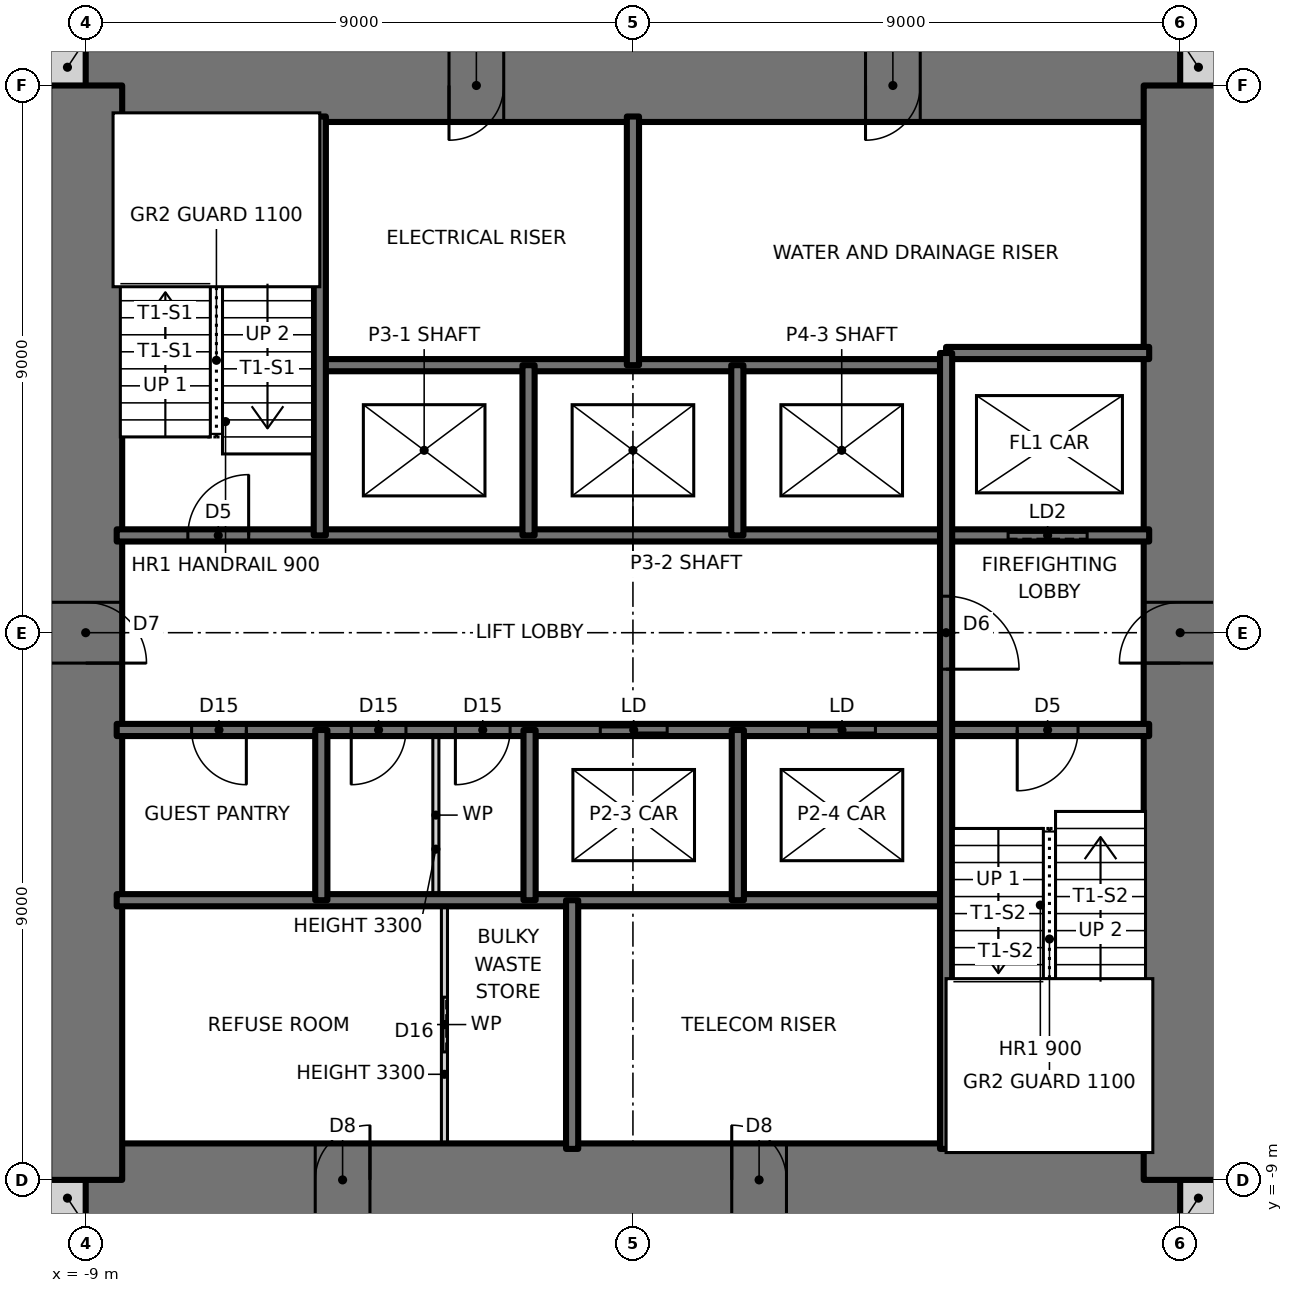
"""IFC4 building model, lengths in metres.
Left out: names, types, materials, properties, quantities, classifications, styles, units other than length and angle.
Written with IfcOpenShell. Run it as: python <this file> out.ifc"""

import sys

from ifc_helpers import new_model, si_unit, direction, frame, frame_2d, origin, place, context, subcontext, project, spatial, rectangle, extrude, element, fill, save


model = new_model("IFC4")
c1 = context("Model", 3, precision=1e-05, world=origin(), true_north=direction((0.0, 1.0)))
c2 = subcontext(c1, "Body", "Model", "MODEL_VIEW")
j1 = project(units=[si_unit("LENGTHUNIT", "METRE"), si_unit("PLANEANGLEUNIT", "RADIAN")], contexts=[c1])
p1 = place(None, origin())
s1 = spatial("IfcSite", under=j1, at=p1, CompositionType="ELEMENT")
p2 = place(p1, origin())
s2 = spatial("IfcBuilding", under=s1, at=p2, CompositionType="ELEMENT")
p3 = place(p2, frame((0.0, 0.0, 115.5)))
s3 = spatial("IfcBuildingStorey", under=s2, at=p3, CompositionType="ELEMENT", Elevation=115.5)
for number, where, z_axis, x_axis in (
    (1, (-9.6, -9.3, 0.0), (0.0, 0.0, 1.0), (1.0, 0.0, 0.0)),
    (2, (9.0, -9.3, 0.0), (0.0, 0.0, 1.0), (1.0, 0.0, 0.0)),
    (3, (9.0, 9.3, 0.0), (0.0, 0.0, 1.0), (1.0, 0.0, 0.0)),
    (4, (-9.6, 9.3, 0.0), (0.0, 0.0, 1.0), (1.0, 0.0, 0.0)),
):
    element("IfcWall", number, at=place(p3, frame(where, z_axis=z_axis, x_axis=x_axis)), inside=s3, PredefinedType="SOLIDWALL", context=c2, shape_type="SweptSolid", body=[
        extrude(rectangle(XDim=0.6, YDim=0.6, at=frame_2d((0.3, 0.0))), origin(), (0.0, 0.0, 1.0), 3.5),
    ])
p4 = place(p3, frame((-9.0, -9.0, 0.0), z_axis=(0.0, 0.0, 1.0), x_axis=(1.0, 0.0, 0.0)))
e5 = element("IfcWall", 5, at=p4, inside=s3, PredefinedType="SHEAR", context=c2, shape_type="SweptSolid", body=[
    extrude(rectangle(XDim=18.0, YDim=1.2, at=frame_2d((9.0, 0.0))), origin(), (0.0, 0.0, 1.0), 3.5),
])
p5 = place(p4, frame((3.775, 0.0, 0.0)))
e6 = element("IfcOpeningElement", 6, at=p5, cuts=e5, PredefinedType="OPENING", context=c2, shape_type="SweptSolid", body=[
    extrude(rectangle(XDim=0.9, YDim=2.1, at=frame_2d((0.45, 1.05))), frame((0.0, 0.61, 0.0), z_axis=(0.0, -1.0, 0.0), x_axis=(1.0, 0.0, 0.0)), (0.0, 0.0, 1.0), 1.22),
])
p6 = place(p4, frame((10.625, 0.0, 0.0)))
e7 = element("IfcOpeningElement", 7, at=p6, cuts=e5, PredefinedType="OPENING", context=c2, shape_type="SweptSolid", body=[
    extrude(rectangle(XDim=0.9, YDim=2.1, at=frame_2d((0.45, 1.05))), frame((0.0, 0.61, 0.0), z_axis=(0.0, -1.0, 0.0), x_axis=(1.0, 0.0, 0.0)), (0.0, 0.0, 1.0), 1.22),
])
p7 = place(p3, frame((9.0, 9.0, 0.0), z_axis=(0.0, 0.0, 1.0), x_axis=(-1.0, 0.0, 0.0)))
e8 = element("IfcWall", 8, at=p7, inside=s3, PredefinedType="SHEAR", context=c2, shape_type="SweptSolid", body=[
    extrude(rectangle(XDim=18.0, YDim=1.2, at=frame_2d((9.0, 0.0))), origin(), (0.0, 0.0, 1.0), 3.5),
])
p8 = place(p7, frame((11.125, 0.0, 0.0)))
e9 = element("IfcOpeningElement", 9, at=p8, cuts=e8, PredefinedType="OPENING", context=c2, shape_type="SweptSolid", body=[
    extrude(rectangle(XDim=0.9, YDim=2.1, at=frame_2d((0.45, 1.05))), frame((0.0, 0.61, 0.0), z_axis=(0.0, -1.0, 0.0), x_axis=(1.0, 0.0, 0.0)), (0.0, 0.0, 1.0), 1.22),
])
p9 = place(p7, frame((4.275, 0.0, 0.0)))
e10 = element("IfcOpeningElement", 10, at=p9, cuts=e8, PredefinedType="OPENING", context=c2, shape_type="SweptSolid", body=[
    extrude(rectangle(XDim=0.9, YDim=2.1, at=frame_2d((0.45, 1.05))), frame((0.0, 0.61, 0.0), z_axis=(0.0, -1.0, 0.0), x_axis=(1.0, 0.0, 0.0)), (0.0, 0.0, 1.0), 1.22),
])
p10 = place(p3, frame((9.0, -9.0, 0.0), z_axis=(0.0, 0.0, 1.0), x_axis=(0.0, 1.0, 0.0)))
e11 = element("IfcWall", 11, at=p10, inside=s3, PredefinedType="SHEAR", context=c2, shape_type="SweptSolid", body=[
    extrude(rectangle(XDim=18.0, YDim=1.2, at=frame_2d((9.0, 0.0))), origin(), (0.0, 0.0, 1.0), 3.5),
])
p11 = place(p10, frame((8.5, 0.0, 0.0)))
e12 = element("IfcOpeningElement", 12, at=p11, cuts=e11, PredefinedType="OPENING", context=c2, shape_type="SweptSolid", body=[
    extrude(rectangle(XDim=1.0, YDim=2.1, at=frame_2d((0.5, 1.05))), frame((0.0, 0.61, 0.0), z_axis=(0.0, -1.0, 0.0), x_axis=(1.0, 0.0, 0.0)), (0.0, 0.0, 1.0), 1.22),
])
p12 = place(p3, frame((-9.0, 9.0, 0.0), z_axis=(0.0, 0.0, 1.0), x_axis=(0.0, -1.0, 0.0)))
e13 = element("IfcWall", 13, at=p12, inside=s3, PredefinedType="SHEAR", context=c2, shape_type="SweptSolid", body=[
    extrude(rectangle(XDim=18.0, YDim=1.2, at=frame_2d((9.0, 0.0))), origin(), (0.0, 0.0, 1.0), 3.5),
])
p13 = place(p12, frame((8.5, 0.0, 0.0)))
e14 = element("IfcOpeningElement", 14, at=p13, cuts=e13, PredefinedType="OPENING", context=c2, shape_type="SweptSolid", body=[
    extrude(rectangle(XDim=1.0, YDim=2.1, at=frame_2d((0.5, 1.05))), frame((0.0, 0.61, 0.0), z_axis=(0.0, -1.0, 0.0), x_axis=(1.0, 0.0, 0.0)), (0.0, 0.0, 1.0), 1.22),
])
p14 = place(p3, frame((-8.49, -4.4, 0.0), z_axis=(0.0, 0.0, 1.0), x_axis=(1.0, 0.0, 0.0)))
e15 = element("IfcWall", 15, at=p14, inside=s3, PredefinedType="SOLIDWALL", context=c2, shape_type="SweptSolid", body=[
    extrude(rectangle(XDim=13.64, YDim=0.2, at=frame_2d((6.82, 0.0))), origin(), (0.0, 0.0, 1.0), 3.5),
])
p15 = place(p3, frame((-8.49, -1.6, 0.0), z_axis=(0.0, 0.0, 1.0), x_axis=(1.0, 0.0, 0.0)))
e16 = element("IfcWall", 16, at=p15, inside=s3, PredefinedType="SOLIDWALL", context=c2, shape_type="SweptSolid", body=[
    extrude(rectangle(XDim=16.98, YDim=0.2, at=frame_2d((8.49, 0.0))), origin(), (0.0, 0.0, 1.0), 3.5),
])
p16 = place(p15, frame((14.81, 0.0, 0.0)))
e17 = element("IfcOpeningElement", 17, at=p16, cuts=e16, PredefinedType="OPENING", context=c2, shape_type="SweptSolid", body=[
    extrude(rectangle(XDim=1.0, YDim=2.1, at=frame_2d((0.5, 1.05))), frame((0.0, 0.11, 0.0), z_axis=(0.0, -1.0, 0.0), x_axis=(1.0, 0.0, 0.0)), (0.0, 0.0, 1.0), 0.22),
])
p17 = place(p15, frame((1.232, 0.0, 0.0)))
e18 = element("IfcOpeningElement", 18, at=p17, cuts=e16, PredefinedType="OPENING", context=c2, shape_type="SweptSolid", body=[
    extrude(rectangle(XDim=0.9, YDim=2.1, at=frame_2d((0.45, 1.05))), frame((0.0, 0.11, 0.0), z_axis=(0.0, -1.0, 0.0), x_axis=(1.0, 0.0, 0.0)), (0.0, 0.0, 1.0), 0.22),
])
p18 = place(p15, frame((5.57, 0.0, 0.0)))
e19 = element("IfcOpeningElement", 19, at=p18, cuts=e16, PredefinedType="OPENING", context=c2, shape_type="SweptSolid", body=[
    extrude(rectangle(XDim=0.9, YDim=2.1, at=frame_2d((0.45, 1.05))), frame((0.0, 0.11, 0.0), z_axis=(0.0, -1.0, 0.0), x_axis=(1.0, 0.0, 0.0)), (0.0, 0.0, 1.0), 0.22),
])
p19 = place(p15, frame((3.857, 0.0, 0.0)))
e20 = element("IfcOpeningElement", 20, at=p19, cuts=e16, PredefinedType="OPENING", context=c2, shape_type="SweptSolid", body=[
    extrude(rectangle(XDim=0.9, YDim=2.1, at=frame_2d((0.45, 1.05))), frame((0.0, 0.11, 0.0), z_axis=(0.0, -1.0, 0.0), x_axis=(1.0, 0.0, 0.0)), (0.0, 0.0, 1.0), 0.22),
])
p20 = place(p15, frame((7.953, 0.0, 0.0)))
e21 = element("IfcOpeningElement", 21, at=p20, cuts=e16, PredefinedType="OPENING", context=c2, shape_type="SweptSolid", body=[
    extrude(rectangle(XDim=1.1, YDim=2.1, at=frame_2d((0.55, 1.05))), frame((0.0, 0.11, 0.0), z_axis=(0.0, -1.0, 0.0), x_axis=(1.0, 0.0, 0.0)), (0.0, 0.0, 1.0), 0.22),
])
p21 = place(p15, frame((11.378, 0.0, 0.0)))
e22 = element("IfcOpeningElement", 22, at=p21, cuts=e16, PredefinedType="OPENING", context=c2, shape_type="SweptSolid", body=[
    extrude(rectangle(XDim=1.1, YDim=2.1, at=frame_2d((0.55, 1.05))), frame((0.0, 0.11, 0.0), z_axis=(0.0, -1.0, 0.0), x_axis=(1.0, 0.0, 0.0)), (0.0, 0.0, 1.0), 0.22),
])
p22 = place(p3, frame((-8.49, 1.6, 0.0), z_axis=(0.0, 0.0, 1.0), x_axis=(1.0, 0.0, 0.0)))
e23 = element("IfcWall", 23, at=p22, inside=s3, PredefinedType="SOLIDWALL", context=c2, shape_type="SweptSolid", body=[
    extrude(rectangle(XDim=16.98, YDim=0.2, at=frame_2d((8.49, 0.0))), origin(), (0.0, 0.0, 1.0), 3.5),
])
p23 = place(p22, frame((1.17, 0.0, 0.0)))
e24 = element("IfcOpeningElement", 24, at=p23, cuts=e23, PredefinedType="OPENING", context=c2, shape_type="SweptSolid", body=[
    extrude(rectangle(XDim=1.0, YDim=2.1, at=frame_2d((0.5, 1.05))), frame((0.0, 0.11, 0.0), z_axis=(0.0, -1.0, 0.0), x_axis=(1.0, 0.0, 0.0)), (0.0, 0.0, 1.0), 0.22),
])
p24 = place(p22, frame((14.66, 0.0, 0.0)))
e25 = element("IfcOpeningElement", 25, at=p24, cuts=e23, PredefinedType="OPENING", context=c2, shape_type="SweptSolid", body=[
    extrude(rectangle(XDim=1.3, YDim=2.1, at=frame_2d((0.65, 1.05))), frame((0.0, 0.11, 0.0), z_axis=(0.0, -1.0, 0.0), x_axis=(1.0, 0.0, 0.0)), (0.0, 0.0, 1.0), 0.22),
])
p25 = place(p3, frame((-5.15, 4.4, 0.0), z_axis=(0.0, 0.0, 1.0), x_axis=(1.0, 0.0, 0.0)))
e26 = element("IfcWall", 26, at=p25, inside=s3, PredefinedType="SOLIDWALL", context=c2, shape_type="SweptSolid", body=[
    extrude(rectangle(XDim=10.3, YDim=0.2, at=frame_2d((5.15, 0.0))), origin(), (0.0, 0.0, 1.0), 3.5),
])
p26 = place(p3, frame((5.15, 4.6, 0.0), z_axis=(0.0, 0.0, 1.0), x_axis=(1.0, 0.0, 0.0)))
e27 = element("IfcWall", 27, at=p26, inside=s3, PredefinedType="SOLIDWALL", context=c2, shape_type="SweptSolid", body=[
    extrude(rectangle(XDim=3.34, YDim=0.2, at=frame_2d((1.67, 0.0))), origin(), (0.0, 0.0, 1.0), 3.5),
])
p27 = place(p3, frame((5.15, -8.49, 0.0), z_axis=(0.0, 0.0, 1.0), x_axis=(0.0, 1.0, 0.0)))
e28 = element("IfcWall", 28, at=p27, inside=s3, PredefinedType="SOLIDWALL", context=c2, shape_type="SweptSolid", body=[
    extrude(rectangle(XDim=13.09, YDim=0.2, at=frame_2d((6.545, 0.0))), origin(), (0.0, 0.0, 1.0), 3.5),
])
p28 = place(p27, frame((7.89, 0.0, 0.0)))
e29 = element("IfcOpeningElement", 29, at=p28, cuts=e28, PredefinedType="OPENING", context=c2, shape_type="SweptSolid", body=[
    extrude(rectangle(XDim=1.2, YDim=2.1, at=frame_2d((0.6, 1.05))), frame((0.0, 0.11, 0.0), z_axis=(0.0, -1.0, 0.0), x_axis=(1.0, 0.0, 0.0)), (0.0, 0.0, 1.0), 0.22),
])
for number, where, z_axis, x_axis in (
    (30, (1.725, -4.4, 0.0), (0.0, 0.0, 1.0), (0.0, 1.0, 0.0)),
    (31, (1.717, 1.6, 0.0), (0.0, 0.0, 1.0), (0.0, 1.0, 0.0)),
):
    element("IfcWall", number, at=place(p3, frame(where, z_axis=z_axis, x_axis=x_axis)), inside=s3, PredefinedType="SOLIDWALL", context=c2, shape_type="SweptSolid", body=[
        extrude(rectangle(XDim=2.8, YDim=0.2, at=frame_2d((1.4, 0.0))), origin(), (0.0, 0.0, 1.0), 3.5),
    ])
for number, where, z_axis, x_axis in (
    (32, (0.0, 4.4, 0.0), (0.0, 0.0, 1.0), (0.0, 1.0, 0.0)),
    (33, (-1.0, -8.49, 0.0), (0.0, 0.0, 1.0), (0.0, 1.0, 0.0)),
):
    element("IfcWall", number, at=place(p3, frame(where, z_axis=z_axis, x_axis=x_axis)), inside=s3, PredefinedType="SOLIDWALL", context=c2, shape_type="SweptSolid", body=[
        extrude(rectangle(XDim=4.09, YDim=0.2, at=frame_2d((2.045, 0.0))), origin(), (0.0, 0.0, 1.0), 3.5),
    ])
for number, where, z_axis, x_axis in (
    (34, (-1.7, -4.4, 0.0), (0.0, 0.0, 1.0), (0.0, 1.0, 0.0)),
    (35, (-1.717, 1.6, 0.0), (0.0, 0.0, 1.0), (0.0, 1.0, 0.0)),
):
    element("IfcWall", number, at=place(p3, frame(where, z_axis=z_axis, x_axis=x_axis)), inside=s3, PredefinedType="SOLIDWALL", context=c2, shape_type="SweptSolid", body=[
        extrude(rectangle(XDim=2.8, YDim=0.2, at=frame_2d((1.4, 0.0))), origin(), (0.0, 0.0, 1.0), 3.5),
    ])
p29 = place(p3, frame((-3.1, -8.49, 0.0), z_axis=(0.0, 0.0, 1.0), x_axis=(0.0, 1.0, 0.0)))
e36 = element("IfcWall", 36, at=p29, inside=s3, PredefinedType="PARTITIONING", context=c2, shape_type="SweptSolid", body=[
    extrude(rectangle(XDim=4.09, YDim=0.1, at=frame_2d((2.045, 0.0))), origin(), (0.0, 0.0, 1.0), 3.3),
])
p30 = place(p29, frame((1.595, 0.0, 0.0)))
e37 = element("IfcOpeningElement", 37, at=p30, cuts=e36, PredefinedType="OPENING", context=c2, shape_type="SweptSolid", body=[
    extrude(rectangle(XDim=0.9, YDim=2.1, at=frame_2d((0.45, 1.05))), frame((0.0, 0.06, 0.0), z_axis=(0.0, -1.0, 0.0), x_axis=(1.0, 0.0, 0.0)), (0.0, 0.0, 1.0), 0.12),
])
p31 = place(p3, frame((-3.241, -4.4, 0.0), z_axis=(0.0, 0.0, 1.0), x_axis=(0.0, 1.0, 0.0)))
e38 = element("IfcWall", 38, at=p31, inside=s3, PredefinedType="PARTITIONING", context=c2, shape_type="SweptSolid", body=[
    extrude(rectangle(XDim=2.8, YDim=0.1, at=frame_2d((1.4, 0.0))), origin(), (0.0, 0.0, 1.0), 3.3),
])
p32 = place(p3, frame((-5.125, -4.4, 0.0), z_axis=(0.0, 0.0, 1.0), x_axis=(0.0, 1.0, 0.0)))
e39 = element("IfcWall", 39, at=p32, inside=s3, PredefinedType="SOLIDWALL", context=c2, shape_type="SweptSolid", body=[
    extrude(rectangle(XDim=2.8, YDim=0.2, at=frame_2d((1.4, 0.0))), origin(), (0.0, 0.0, 1.0), 3.5),
])
p33 = place(p3, frame((-5.15, 1.6, 0.0), z_axis=(0.0, 0.0, 1.0), x_axis=(0.0, 1.0, 0.0)))
e40 = element("IfcWall", 40, at=p33, inside=s3, PredefinedType="SOLIDWALL", context=c2, shape_type="SweptSolid", body=[
    extrude(rectangle(XDim=6.89, YDim=0.2, at=frame_2d((3.445, 0.0))), origin(), (0.0, 0.0, 1.0), 3.5),
])
p34 = place(p23, origin())
e41 = element("IfcDoor", 41, at=p34, inside=s3, OperationType="SINGLE_SWING_RIGHT", PredefinedType="DOOR", context=c2, shape_type="SweptSolid", body=[
    extrude(rectangle(XDim=1.0, YDim=2.1, at=frame_2d((0.5, 1.05))), frame((0.0, 0.025, 0.0), z_axis=(0.0, -1.0, 0.0), x_axis=(1.0, 0.0, 0.0)), (0.0, 0.0, 1.0), 0.05),
])
fill(e24, e41)
p35 = place(p16, frame((1.0, 0.0, 0.0), z_axis=(0.0, 0.0, 1.0), x_axis=(-1.0, 0.0, 0.0)))
e42 = element("IfcDoor", 42, at=p35, inside=s3, OperationType="SINGLE_SWING_RIGHT", PredefinedType="DOOR", context=c2, shape_type="SweptSolid", body=[
    extrude(rectangle(XDim=1.0, YDim=2.1, at=frame_2d((0.5, 1.05))), frame((0.0, 0.025, 0.0), z_axis=(0.0, -1.0, 0.0), x_axis=(1.0, 0.0, 0.0)), (0.0, 0.0, 1.0), 0.05),
])
fill(e17, e42)
p36 = place(p28, frame((1.2, 0.0, 0.0), z_axis=(0.0, 0.0, 1.0), x_axis=(-1.0, 0.0, 0.0)))
e43 = element("IfcDoor", 43, at=p36, inside=s3, OperationType="SINGLE_SWING_RIGHT", PredefinedType="DOOR", context=c2, shape_type="SweptSolid", body=[
    extrude(rectangle(XDim=1.2, YDim=2.1, at=frame_2d((0.6, 1.05))), frame((0.0, 0.025, 0.0), z_axis=(0.0, -1.0, 0.0), x_axis=(1.0, 0.0, 0.0)), (0.0, 0.0, 1.0), 0.05),
])
fill(e29, e43)
p37 = place(p17, frame((0.9, 0.0, 0.0), z_axis=(0.0, 0.0, 1.0), x_axis=(-1.0, 0.0, 0.0)))
e44 = element("IfcDoor", 44, at=p37, inside=s3, OperationType="SINGLE_SWING_LEFT", PredefinedType="DOOR", context=c2, shape_type="SweptSolid", body=[
    extrude(rectangle(XDim=0.9, YDim=2.1, at=frame_2d((0.45, 1.05))), frame((0.0, 0.025, 0.0), z_axis=(0.0, -1.0, 0.0), x_axis=(1.0, 0.0, 0.0)), (0.0, 0.0, 1.0), 0.05),
])
fill(e18, e44)
p38 = place(p18, frame((0.9, 0.0, 0.0), z_axis=(0.0, 0.0, 1.0), x_axis=(-1.0, 0.0, 0.0)))
e45 = element("IfcDoor", 45, at=p38, inside=s3, OperationType="SINGLE_SWING_RIGHT", PredefinedType="DOOR", context=c2, shape_type="SweptSolid", body=[
    extrude(rectangle(XDim=0.9, YDim=2.1, at=frame_2d((0.45, 1.05))), frame((0.0, 0.025, 0.0), z_axis=(0.0, -1.0, 0.0), x_axis=(1.0, 0.0, 0.0)), (0.0, 0.0, 1.0), 0.05),
])
fill(e19, e45)
p39 = place(p19, frame((0.9, 0.0, 0.0), z_axis=(0.0, 0.0, 1.0), x_axis=(-1.0, 0.0, 0.0)))
e46 = element("IfcDoor", 46, at=p39, inside=s3, OperationType="SINGLE_SWING_RIGHT", PredefinedType="DOOR", context=c2, shape_type="SweptSolid", body=[
    extrude(rectangle(XDim=0.9, YDim=2.1, at=frame_2d((0.45, 1.05))), frame((0.0, 0.025, 0.0), z_axis=(0.0, -1.0, 0.0), x_axis=(1.0, 0.0, 0.0)), (0.0, 0.0, 1.0), 0.05),
])
fill(e20, e46)
p40 = place(p30, origin())
e47 = element("IfcDoor", 47, at=p40, inside=s3, OperationType="SLIDING_TO_LEFT", PredefinedType="DOOR", context=c2, shape_type="SweptSolid", body=[
    extrude(rectangle(XDim=0.9, YDim=2.1, at=frame_2d((0.45, 1.05))), frame((0.0, 0.025, 0.0), z_axis=(0.0, -1.0, 0.0), x_axis=(1.0, 0.0, 0.0)), (0.0, 0.0, 1.0), 0.05),
])
fill(e37, e47)
p41 = place(p13, origin())
e48 = element("IfcDoor", 48, at=p41, inside=s3, OperationType="SINGLE_SWING_RIGHT", PredefinedType="DOOR", context=c2, shape_type="SweptSolid", body=[
    extrude(rectangle(XDim=1.0, YDim=2.1, at=frame_2d((0.5, 1.05))), frame((0.0, 0.025, 0.0), z_axis=(0.0, -1.0, 0.0), x_axis=(1.0, 0.0, 0.0)), (0.0, 0.0, 1.0), 0.05),
])
fill(e14, e48)
p42 = place(p11, origin())
e49 = element("IfcDoor", 49, at=p42, inside=s3, OperationType="SINGLE_SWING_LEFT", PredefinedType="DOOR", context=c2, shape_type="SweptSolid", body=[
    extrude(rectangle(XDim=1.0, YDim=2.1, at=frame_2d((0.5, 1.05))), frame((0.0, 0.025, 0.0), z_axis=(0.0, -1.0, 0.0), x_axis=(1.0, 0.0, 0.0)), (0.0, 0.0, 1.0), 0.05),
])
fill(e12, e49)
p43 = place(p8, origin())
e50 = element("IfcDoor", 50, at=p43, inside=s3, OperationType="SINGLE_SWING_RIGHT", PredefinedType="DOOR", context=c2, shape_type="SweptSolid", body=[
    extrude(rectangle(XDim=0.9, YDim=2.1, at=frame_2d((0.45, 1.05))), frame((0.0, 0.025, 0.0), z_axis=(0.0, -1.0, 0.0), x_axis=(1.0, 0.0, 0.0)), (0.0, 0.0, 1.0), 0.05),
])
fill(e9, e50)
p44 = place(p9, origin())
e51 = element("IfcDoor", 51, at=p44, inside=s3, OperationType="SINGLE_SWING_RIGHT", PredefinedType="DOOR", context=c2, shape_type="SweptSolid", body=[
    extrude(rectangle(XDim=0.9, YDim=2.1, at=frame_2d((0.45, 1.05))), frame((0.0, 0.025, 0.0), z_axis=(0.0, -1.0, 0.0), x_axis=(1.0, 0.0, 0.0)), (0.0, 0.0, 1.0), 0.05),
])
fill(e10, e51)
p45 = place(p5, origin())
e52 = element("IfcDoor", 52, at=p45, inside=s3, OperationType="SINGLE_SWING_RIGHT", PredefinedType="DOOR", context=c2, shape_type="SweptSolid", body=[
    extrude(rectangle(XDim=0.9, YDim=2.1, at=frame_2d((0.45, 1.05))), frame((0.0, 0.025, 0.0), z_axis=(0.0, -1.0, 0.0), x_axis=(1.0, 0.0, 0.0)), (0.0, 0.0, 1.0), 0.05),
])
fill(e6, e52)
p46 = place(p6, origin())
e53 = element("IfcDoor", 53, at=p46, inside=s3, OperationType="SINGLE_SWING_LEFT", PredefinedType="DOOR", context=c2, shape_type="SweptSolid", body=[
    extrude(rectangle(XDim=0.9, YDim=2.1, at=frame_2d((0.45, 1.05))), frame((0.0, 0.025, 0.0), z_axis=(0.0, -1.0, 0.0), x_axis=(1.0, 0.0, 0.0)), (0.0, 0.0, 1.0), 0.05),
])
fill(e7, e53)
p47 = place(p20, origin())
e54 = element("IfcDoor", 54, at=p47, inside=s3, OperationType="DOUBLE_DOOR_SLIDING", PredefinedType="DOOR", context=c2, shape_type="SweptSolid", body=[
    extrude(rectangle(XDim=1.1, YDim=2.1, at=frame_2d((0.55, 1.05))), frame((0.0, 0.025, 0.0), z_axis=(0.0, -1.0, 0.0), x_axis=(1.0, 0.0, 0.0)), (0.0, 0.0, 1.0), 0.05),
])
fill(e21, e54)
p48 = place(p21, origin())
e55 = element("IfcDoor", 55, at=p48, inside=s3, OperationType="DOUBLE_DOOR_SLIDING", PredefinedType="DOOR", context=c2, shape_type="SweptSolid", body=[
    extrude(rectangle(XDim=1.1, YDim=2.1, at=frame_2d((0.55, 1.05))), frame((0.0, 0.025, 0.0), z_axis=(0.0, -1.0, 0.0), x_axis=(1.0, 0.0, 0.0)), (0.0, 0.0, 1.0), 0.05),
])
fill(e22, e55)
p49 = place(p24, origin())
e56 = element("IfcDoor", 56, at=p49, inside=s3, OperationType="SLIDING_TO_LEFT", PredefinedType="DOOR", context=c2, shape_type="SweptSolid", body=[
    extrude(rectangle(XDim=1.3, YDim=2.1, at=frame_2d((0.65, 1.05))), frame((0.0, 0.025, 0.0), z_axis=(0.0, -1.0, 0.0), x_axis=(1.0, 0.0, 0.0)), (0.0, 0.0, 1.0), 0.05),
])
fill(e25, e56)
save(model, sys.argv[1])
